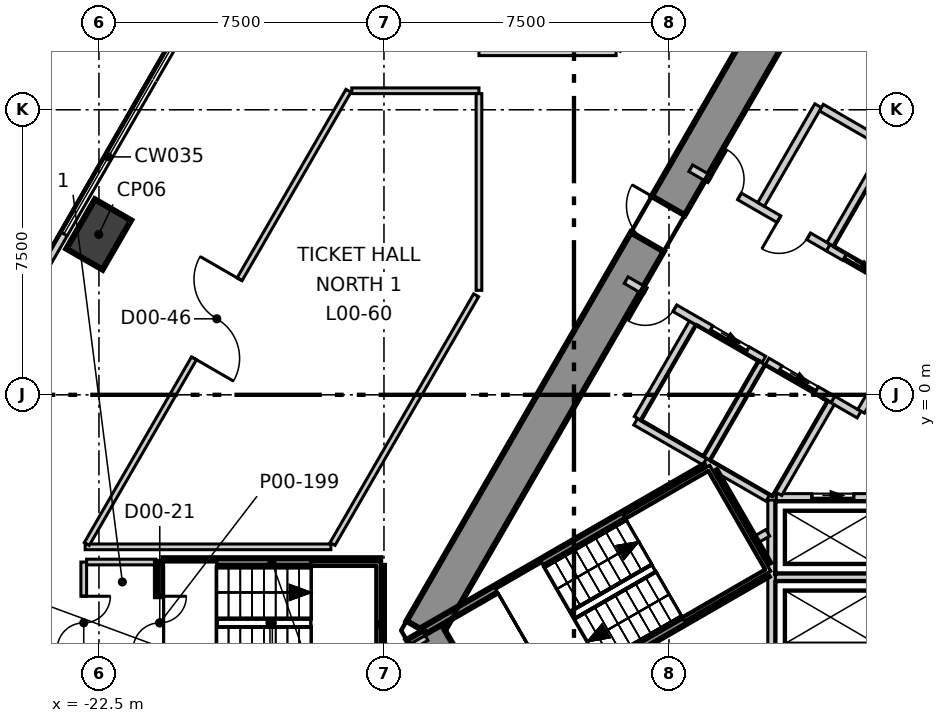
"""IFC4 building model, lengths in metres.
Left out: names, types, materials, properties, quantities, classifications, styles, units other than length and angle.
Written with IfcOpenShell. Run it as: python <this file> out.ifc"""

import sys

from ifc_helpers import new_model, si_unit, direction, frame, frame_2d, origin, origin_2d, place, context, subcontext, project, spatial, polyline, rectangle, outline, extrude, element, fill, save


model = new_model("IFC4")
c1 = context("Model", 3, precision=1e-05, world=origin(), true_north=direction((0.0, 1.0)))
c2 = subcontext(c1, "Body", "Model", "MODEL_VIEW")
j1 = project(units=[si_unit("LENGTHUNIT", "METRE"), si_unit("PLANEANGLEUNIT", "RADIAN")], contexts=[c1])
p1 = place(None, origin())
s1 = spatial("IfcSite", under=j1, at=p1, CompositionType="ELEMENT")
p2 = place(p1, origin())
s2 = spatial("IfcBuilding", under=s1, at=p2, CompositionType="ELEMENT")
p3 = place(p2, origin())
s3 = spatial("IfcBuildingStorey", under=s2, at=p3, CompositionType="ELEMENT", Elevation=0.0)
p4 = place(p3, frame((-1.617, 15.2, -0.4), z_axis=(0.0, 0.0, 1.0), x_axis=(-0.499992141631, -0.866029940768, 0.0)))
e1 = element("IfcWall", 1, at=p4, inside=s3, PredefinedType="SHEAR", context=c2, shape_type="SweptSolid", body=[
    extrude(outline(polyline([(-0.289, -0.499), (1.656, -0.499), (3.601, -0.499), (5.547, -0.499), (7.492, -0.499), (9.437, -0.5), (11.382, -0.5), (13.328, -0.5), (15.273, -0.5), (17.218, -0.5), (19.163, -0.5), (21.109, -0.5), (23.054, -0.5), (24.999, -0.5), (24.422, 0.5), (22.566, 0.5), (20.709, 0.5), (18.853, 0.5), (16.997, 0.5), (15.14, 0.5), (13.284, 0.5), (11.427, 0.5), (9.571, 0.5), (7.715, 0.5), (5.858, 0.5), (4.002, 0.5), (2.146, 0.5), (0.289, 0.5), (-0.289, -0.499)])), origin(), (0.0, 0.0, 1.0), 8.5),
])
p5 = place(p4, frame((11.805, 0.0, 0.4)))
e2 = element("IfcOpeningElement", 2, at=p5, cuts=e1, PredefinedType="OPENING", context=c2, shape_type="SweptSolid", body=[
    extrude(rectangle(XDim=1.1, YDim=2.1, at=frame_2d((0.55, 1.05))), frame((0.0, 0.51, 0.0), z_axis=(0.0, -1.0, 0.0), x_axis=(1.0, 0.0, 0.0)), (0.0, 0.0, 1.0), 1.02),
])
p6 = place(p3, frame((-13.972, -6.2, -0.4), z_axis=(0.0, 0.0, 1.0), x_axis=(0.500077567175, -0.865980615723, 0.0)))
e3 = element("IfcWall", 3, at=p6, inside=s3, PredefinedType="SHEAR", context=c2, shape_type="SweptSolid", body=[
    extrude(outline(polyline([(-0.289, -0.5), (1.616, -0.5), (3.522, -0.5), (2.944, 0.499), (1.617, 0.5), (0.289, 0.5), (-0.289, -0.5)])), origin(), (0.0, 0.0, 1.0), 8.5),
])
p7 = place(p6, frame((0.917, 0.0, 0.4)))
e4 = element("IfcOpeningElement", 4, at=p7, cuts=e3, PredefinedType="OPENING", context=c2, shape_type="SweptSolid", body=[
    extrude(rectangle(XDim=1.4, YDim=2.1, at=frame_2d((0.7, 1.05))), frame((0.0, 0.51, 0.0), z_axis=(0.0, -1.0, 0.0), x_axis=(1.0, 0.0, 0.0)), (0.0, 0.0, 1.0), 1.02),
])
p8 = place(p3, frame((-22.506, 4.219, -0.4), z_axis=(0.0, 0.0, 1.0), x_axis=(0.5, 0.866025403784, 0.0)))
e5 = element("IfcColumn", 5, at=p8, inside=s3, PredefinedType="COLUMN", context=c2, shape_type="SweptSolid", body=[
    extrude(rectangle(XDim=1.5, YDim=1.1, at=origin_2d()), origin(), (0.0, 0.0, 1.0), 8.5),
])
p9 = place(p3, frame((-23.422, 4.232, 0.0), z_axis=(0.0, 0.0, 1.0), x_axis=(-0.500009288593, -0.866020040946, 0.0)))
e6 = element("IfcWall", 6, at=p9, inside=s3, PredefinedType="ELEMENTEDWALL", context=c2, shape_type="SweptSolid", body=[
    extrude(rectangle(XDim=4.2, YDim=0.2, at=frame_2d((2.1, 0.0))), origin(), (0.0, 0.0, 1.0), 8.1),
])
p10 = place(p9, frame((0.9, 0.0, 0.0)))
e7 = element("IfcOpeningElement", 7, at=p10, cuts=e6, PredefinedType="OPENING", context=c2, shape_type="SweptSolid", body=[
    extrude(rectangle(XDim=2.4, YDim=3.2, at=frame_2d((1.2, 1.6))), frame((0.0, 0.11, 0.0), z_axis=(0.0, -1.0, 0.0), x_axis=(1.0, 0.0, 0.0)), (0.0, 0.0, 1.0), 0.22),
])
p11 = place(p3, frame((-22.9, -7.525, 0.0), z_axis=(0.0, 0.0, 1.0), x_axis=(0.0, 1.0, 0.0)))
e8 = element("IfcWall", 8, at=p11, inside=s3, PredefinedType="PARTITIONING", context=c2, shape_type="SweptSolid", body=[
    extrude(rectangle(XDim=3.125, YDim=0.15, at=frame_2d((1.562, 0.0))), origin(), (0.0, 0.0, 1.0), 8.1),
])
p12 = place(p11, frame((0.825, 0.0, 0.0)))
e9 = element("IfcOpeningElement", 9, at=p12, cuts=e8, PredefinedType="OPENING", context=c2, shape_type="SweptSolid", body=[
    extrude(rectangle(XDim=1.4, YDim=2.1, at=frame_2d((0.7, 1.05))), frame((0.0, 0.085, 0.0), z_axis=(0.0, -1.0, 0.0), x_axis=(1.0, 0.0, 0.0)), (0.0, 0.0, 1.0), 0.17),
])
p13 = place(p3, frame((-22.825, -4.4, 0.0), z_axis=(0.0, 0.0, 1.0), x_axis=(1.0, 0.0, 0.0)))
e10 = element("IfcWall", 10, at=p13, inside=s3, PredefinedType="PARTITIONING", context=c2, shape_type="SweptSolid", body=[
    extrude(rectangle(XDim=1.825, YDim=0.15, at=frame_2d((0.913, 0.0))), origin(), (0.0, 0.0, 1.0), 8.1),
])
p14 = place(p3, frame((-15.0, -7.044, 0.0), z_axis=(0.0, 0.0, 1.0), x_axis=(0.866025099701, 0.500000526688, 0.0)))
e11 = element("IfcWall", 11, at=p14, inside=s3, PredefinedType="PARTITIONING", context=c2, shape_type="SweptSolid", body=[
    extrude(rectangle(XDim=1.292, YDim=0.15, at=frame_2d((0.646, 0.0))), origin(), (0.0, 0.0, 1.0), 8.1),
])
p15 = place(p3, frame((-22.863, -4.0, 0.0), z_axis=(0.0, 0.0, 1.0), x_axis=(1.0, 0.0, 0.0)))
e12 = element("IfcWall", 12, at=p15, inside=s3, PredefinedType="PARTITIONING", context=c2, shape_type="SweptSolid", body=[
    extrude(rectangle(XDim=6.466, YDim=0.15, at=frame_2d((3.233, 0.0))), origin(), (0.0, 0.0, 1.0), 8.1),
])
p16 = place(p3, frame((-12.5, 9.0, 0.0), z_axis=(0.0, 0.0, 1.0), x_axis=(1.0, 0.0, 0.0)))
e13 = element("IfcWall", 13, at=p16, inside=s3, PredefinedType="PARTITIONING", context=c2, shape_type="SweptSolid", body=[
    extrude(rectangle(XDim=3.609, YDim=0.15, at=frame_2d((1.804, 0.0))), origin(), (0.0, 0.0, 1.0), 8.1),
])
p17 = place(p3, frame((-22.82, -3.925, 0.0), z_axis=(0.0, 0.0, 1.0), x_axis=(0.500004336333, 0.866022900187, 0.0)))
e14 = element("IfcWall", 14, at=p17, inside=s3, PredefinedType="PARTITIONING", context=c2, shape_type="SweptSolid", body=[
    extrude(rectangle(XDim=13.77, YDim=0.15, at=frame_2d((6.885, 0.0))), origin(), (0.0, 0.0, 1.0), 8.1),
])
p18 = place(p17, frame((5.642, 0.0, 0.0)))
e15 = element("IfcOpeningElement", 15, at=p18, cuts=e14, PredefinedType="OPENING", context=c2, shape_type="SweptSolid", body=[
    extrude(rectangle(XDim=2.4, YDim=2.1, at=frame_2d((1.2, 1.05))), frame((0.0, 0.085, 0.0), z_axis=(0.0, -1.0, 0.0), x_axis=(1.0, 0.0, 0.0)), (0.0, 0.0, 1.0), 0.17),
])
p19 = place(p3, frame((-15.848, 8.0, 0.0), z_axis=(0.0, 0.0, 1.0), x_axis=(1.0, 0.0, 0.0)))
e16 = element("IfcWall", 16, at=p19, inside=s3, PredefinedType="PARTITIONING", context=c2, shape_type="SweptSolid", body=[
    extrude(rectangle(XDim=3.348, YDim=0.15, at=frame_2d((1.674, 0.0))), origin(), (0.0, 0.0, 1.0), 8.1),
])
p20 = place(p3, frame((-12.5, 2.749, 0.0), z_axis=(0.0, 0.0, 1.0), x_axis=(0.0, 1.0, 0.0)))
e17 = element("IfcWall", 17, at=p20, inside=s3, PredefinedType="PARTITIONING", context=c2, shape_type="SweptSolid", body=[
    extrude(rectangle(XDim=5.176, YDim=0.15, at=frame_2d((2.588, 0.0))), origin(), (0.0, 0.0, 1.0), 8.1),
])
p21 = place(p3, frame((-16.353, -3.925, 0.0), z_axis=(0.0, 0.0, 1.0), x_axis=(0.499992812315, 0.866029553557, 0.0)))
e18 = element("IfcWall", 18, at=p21, inside=s3, PredefinedType="PARTITIONING", context=c2, shape_type="SweptSolid", body=[
    extrude(rectangle(XDim=7.556, YDim=0.15, at=frame_2d((3.778, 0.0))), origin(), (0.0, 0.0, 1.0), 8.1),
])
p22 = place(p3, frame((-8.376, -0.707, 0.0), z_axis=(0.0, 0.0, 1.0), x_axis=(0.866067520717, -0.499927044236, 0.0)))
e19 = element("IfcWall", 19, at=p22, inside=s3, PredefinedType="SOLIDWALL", context=c2, shape_type="SweptSolid", body=[
    extrude(rectangle(XDim=2.1, YDim=0.2, at=frame_2d((1.05, 0.0))), origin(), (0.0, 0.0, 1.0), 8.1),
])
p23 = place(p3, frame((-8.326, -0.62, 0.0), z_axis=(0.0, 0.0, 1.0), x_axis=(0.500023687443, 0.866011727401, 0.0)))
e20 = element("IfcWall", 20, at=p23, inside=s3, PredefinedType="SOLIDWALL", context=c2, shape_type="SweptSolid", body=[
    extrude(rectangle(XDim=2.9, YDim=0.2, at=frame_2d((1.45, 0.0))), origin(), (0.0, 0.0, 1.0), 8.1),
])
p24 = place(p3, frame((-4.8, -6.9, 0.0), z_axis=(0.0, 0.0, 1.0), x_axis=(0.0, 1.0, 0.0)))
e21 = element("IfcWall", 21, at=p24, inside=s3, PredefinedType="SOLIDWALL", context=c2, shape_type="SweptSolid", body=[
    extrude(rectangle(XDim=4.131, YDim=0.2, at=frame_2d((2.065, 0.0))), origin(), (0.0, 0.0, 1.0), 8.1),
])
p25 = place(p3, frame((-4.7, -4.8, 0.0), z_axis=(0.0, 0.0, 1.0), x_axis=(1.0, 0.0, 0.0)))
e22 = element("IfcWall", 22, at=p25, inside=s3, PredefinedType="SOLIDWALL", context=c2, shape_type="SweptSolid", body=[
    extrude(rectangle(XDim=2.9, YDim=0.2, at=frame_2d((1.45, 0.0))), origin(), (0.0, 0.0, 1.0), 8.1),
])
p26 = place(p3, frame((-4.676, -2.7, 0.0), z_axis=(0.0, 0.0, 1.0), x_axis=(1.0, 0.0, 0.0)))
e23 = element("IfcWall", 23, at=p26, inside=s3, PredefinedType="SOLIDWALL", context=c2, shape_type="SweptSolid", body=[
    extrude(rectangle(XDim=2.873, YDim=0.2, at=frame_2d((1.437, 0.0))), origin(), (0.0, 0.0, 1.0), 8.1),
])
p27 = place(p26, frame((0.937, 0.0, 0.0)))
e24 = element("IfcOpeningElement", 24, at=p27, cuts=e23, PredefinedType="OPENING", context=c2, shape_type="SweptSolid", body=[
    extrude(rectangle(XDim=1.1, YDim=2.1, at=frame_2d((0.55, 1.05))), frame((0.0, 0.11, 0.0), z_axis=(0.0, -1.0, 0.0), x_axis=(1.0, 0.0, 0.0)), (0.0, 0.0, 1.0), 0.22),
])
p28 = place(p3, frame((-8.627, 3.018, 0.0), z_axis=(0.0, 0.0, 1.0), x_axis=(0.866039775641, -0.499975106388, 0.0)))
e25 = element("IfcWall", 25, at=p28, inside=s3, PredefinedType="SOLIDWALL", context=c2, shape_type="SweptSolid", body=[
    extrude(rectangle(XDim=4.182, YDim=0.2, at=frame_2d((2.091, 0.0))), origin(), (0.0, 0.0, 1.0), 8.1),
])
p29 = place(p28, frame((2.58, 0.0, 0.0)))
e26 = element("IfcOpeningElement", 26, at=p29, cuts=e25, PredefinedType="OPENING", context=c2, shape_type="SweptSolid", body=[
    extrude(rectangle(XDim=1.1, YDim=2.1, at=frame_2d((0.55, 1.05))), frame((0.0, 0.11, 0.0), z_axis=(0.0, -1.0, 0.0), x_axis=(1.0, 0.0, 0.0)), (0.0, 0.0, 1.0), 0.22),
])
p30 = place(p28, frame((0.58, 0.0, 0.0)))
e27 = element("IfcOpeningElement", 27, at=p30, cuts=e25, PredefinedType="OPENING", context=c2, shape_type="SweptSolid", body=[
    extrude(rectangle(XDim=0.9, YDim=2.1, at=frame_2d((0.45, 1.05))), frame((0.0, 0.11, 0.0), z_axis=(0.0, -1.0, 0.0), x_axis=(1.0, 0.0, 0.0)), (0.0, 0.0, 1.0), 0.22),
])
p31 = place(p3, frame((-3.188, -0.122, 0.0), z_axis=(0.0, 0.0, 1.0), x_axis=(0.865705793592, -0.50055317294, 0.0)))
e28 = element("IfcWall", 28, at=p31, inside=s3, PredefinedType="SOLIDWALL", context=c2, shape_type="SweptSolid", body=[
    extrude(rectangle(XDim=0.797, YDim=0.2, at=frame_2d((0.398, 0.0))), origin(), (0.0, 0.0, 1.0), 8.1),
])
p32 = place(p3, frame((-6.927, 5.962, 0.0), z_axis=(0.0, 0.0, 1.0), x_axis=(0.866065051207, -0.49993132236, 0.0)))
e29 = element("IfcWall", 29, at=p32, inside=s3, PredefinedType="SOLIDWALL", context=c2, shape_type="SweptSolid", body=[
    extrude(rectangle(XDim=4.182, YDim=0.2, at=frame_2d((2.091, 0.0))), origin(), (0.0, 0.0, 1.0), 8.1),
])
p33 = place(p32, frame((2.68, 0.0, 0.0)))
e30 = element("IfcOpeningElement", 30, at=p33, cuts=e29, PredefinedType="OPENING", context=c2, shape_type="SweptSolid", body=[
    extrude(rectangle(XDim=0.9, YDim=2.1, at=frame_2d((0.45, 1.05))), frame((0.0, 0.11, 0.0), z_axis=(0.0, -1.0, 0.0), x_axis=(1.0, 0.0, 0.0)), (0.0, 0.0, 1.0), 0.22),
])
p34 = place(p32, frame((0.58, 0.0, 0.0)))
e31 = element("IfcOpeningElement", 31, at=p34, cuts=e29, PredefinedType="OPENING", context=c2, shape_type="SweptSolid", body=[
    extrude(rectangle(XDim=0.9, YDim=2.1, at=frame_2d((0.45, 1.05))), frame((0.0, 0.11, 0.0), z_axis=(0.0, -1.0, 0.0), x_axis=(1.0, 0.0, 0.0)), (0.0, 0.0, 1.0), 0.22),
])
p35 = place(p3, frame((-5.076, 5.009, 0.0), z_axis=(0.0, 0.0, 1.0), x_axis=(0.50002537861, 0.866010750942, 0.0)))
e32 = element("IfcWall", 32, at=p35, inside=s3, PredefinedType="SOLIDWALL", context=c2, shape_type="SweptSolid", body=[
    extrude(rectangle(XDim=3.0, YDim=0.2, at=frame_2d((1.5, 0.0))), origin(), (0.0, 0.0, 1.0), 8.1),
])
p36 = place(p3, frame((-3.489, 7.557, 0.0), z_axis=(0.0, 0.0, 1.0), x_axis=(0.866010750942, -0.50002537861, 0.0)))
e33 = element("IfcWall", 33, at=p36, inside=s3, PredefinedType="SOLIDWALL", context=c2, shape_type="SweptSolid", body=[
    extrude(rectangle(XDim=2.0, YDim=0.2, at=frame_2d((1.0, 0.0))), origin(), (0.0, 0.0, 1.0), 8.1),
])
p37 = place(p3, frame((-2.444, -0.433, 0.0), z_axis=(0.0, 0.0, 1.0), x_axis=(0.500035624827, 0.866004834804, 0.0)))
e34 = element("IfcWall", 34, at=p37, inside=s3, PredefinedType="SOLIDWALL", context=c2, shape_type="SweptSolid", body=[
    extrude(rectangle(XDim=3.194, YDim=0.2, at=frame_2d((1.597, 0.0))), origin(), (0.0, 0.0, 1.0), 8.1),
])
p38 = place(p3, frame((-6.557, -1.757, 0.0), z_axis=(0.0, 0.0, 1.0), x_axis=(0.8659754619, -0.500086491905, 0.0)))
e35 = element("IfcWall", 35, at=p38, inside=s3, PredefinedType="SOLIDWALL", context=c2, shape_type="SweptSolid", body=[
    extrude(rectangle(XDim=1.916, YDim=0.2, at=frame_2d((0.958, 0.0))), origin(), (0.0, 0.0, 1.0), 8.1),
])
p39 = place(p3, frame((-6.507, -1.67, 0.0), z_axis=(0.0, 0.0, 1.0), x_axis=(0.50012328804, 0.865954211699, 0.0)))
e36 = element("IfcWall", 36, at=p39, inside=s3, PredefinedType="SOLIDWALL", context=c2, shape_type="SweptSolid", body=[
    extrude(rectangle(XDim=2.9, YDim=0.2, at=frame_2d((1.45, 0.0))), origin(), (0.0, 0.0, 1.0), 8.1),
])
p40 = place(p3, frame((-4.92, 0.878, 0.0), z_axis=(0.0, 0.0, 1.0), x_axis=(0.866010750942, -0.50002537861, 0.0)))
e37 = element("IfcWall", 37, at=p40, inside=s3, PredefinedType="SOLIDWALL", context=c2, shape_type="SweptSolid", body=[
    extrude(rectangle(XDim=2.0, YDim=0.2, at=frame_2d((1.0, 0.0))), origin(), (0.0, 0.0, 1.0), 8.1),
])
p41 = place(p40, frame((0.4, 0.0, 0.0)))
e38 = element("IfcOpeningElement", 38, at=p41, cuts=e37, PredefinedType="OPENING", context=c2, shape_type="SweptSolid", body=[
    extrude(rectangle(XDim=1.1, YDim=2.1, at=frame_2d((0.55, 1.05))), frame((0.0, 0.11, 0.0), z_axis=(0.0, -1.0, 0.0), x_axis=(1.0, 0.0, 0.0)), (0.0, 0.0, 1.0), 0.22),
])
p42 = place(p3, frame((-4.619, -2.6, 0.0), z_axis=(0.0, 0.0, 1.0), x_axis=(0.50009492287, 0.865970593103, 0.0)))
e39 = element("IfcWall", 39, at=p42, inside=s3, PredefinedType="SOLIDWALL", context=c2, shape_type="SweptSolid", body=[
    extrude(rectangle(XDim=2.761, YDim=0.2, at=frame_2d((1.381, 0.0))), origin(), (0.0, 0.0, 1.0), 8.1),
])
p43 = place(p3, frame((-3.309, 3.873, 0.0), z_axis=(0.0, 0.0, 1.0), x_axis=(0.866098583652, -0.499873227325, 0.0)))
e40 = element("IfcWall", 40, at=p43, inside=s3, PredefinedType="SOLIDWALL", context=c2, shape_type="SweptSolid", body=[
    extrude(rectangle(XDim=2.103, YDim=0.2, at=frame_2d((1.051, 0.0))), origin(), (0.0, 0.0, 1.0), 8.1),
])
p44 = place(p43, frame((0.502, 0.0, 0.0)))
e41 = element("IfcOpeningElement", 41, at=p44, cuts=e40, PredefinedType="OPENING", context=c2, shape_type="SweptSolid", body=[
    extrude(rectangle(XDim=1.1, YDim=2.1, at=frame_2d((0.55, 1.05))), frame((0.0, 0.11, 0.0), z_axis=(0.0, -1.0, 0.0), x_axis=(1.0, 0.0, 0.0)), (0.0, 0.0, 1.0), 0.22),
])
p45 = place(p3, frame((-3.257, 3.959, 0.0), z_axis=(0.0, 0.0, 1.0), x_axis=(0.50012328804, 0.865954211699, 0.0)))
e42 = element("IfcWall", 42, at=p45, inside=s3, PredefinedType="SOLIDWALL", context=c2, shape_type="SweptSolid", body=[
    extrude(rectangle(XDim=2.9, YDim=0.2, at=frame_2d((1.45, 0.0))), origin(), (0.0, 0.0, 1.0), 8.1),
])
p46 = place(p3, frame((-5.195, -3.801, 0.0), z_axis=(0.0, 0.0, 1.0), x_axis=(0.86665063443, 0.498915501706, 0.0)))
e43 = element("IfcWall", 43, at=p46, inside=s3, PredefinedType="SOLIDWALL", context=c2, shape_type="SweptSolid", body=[
    extrude(rectangle(XDim=0.341, YDim=0.2, at=frame_2d((0.17, 0.0))), origin(), (0.0, 0.0, 1.0), 8.1),
])
p47 = place(p3, frame((-13.946, -6.204, 0.0), z_axis=(0.0, 0.0, 1.0), x_axis=(0.866036527536, 0.499980732602, 0.0)))
e44 = element("IfcWall", 44, at=p47, inside=s3, PredefinedType="SOLIDWALL", context=c2, shape_type="SweptSolid", body=[
    extrude(rectangle(XDim=8.564, YDim=0.2, at=frame_2d((4.282, 0.0))), origin(), (0.0, 0.0, 1.0), 8.1),
])
p48 = place(p3, frame((-6.329, -2.038, 0.0), z_axis=(0.0, 0.0, 1.0), x_axis=(0.500200581029, -0.865909567298, 0.0)))
e45 = element("IfcWall", 45, at=p48, inside=s3, PredefinedType="SOLIDWALL", context=c2, shape_type="SweptSolid", body=[
    extrude(rectangle(XDim=2.799, YDim=0.2, at=frame_2d((1.399, 0.0))), origin(), (0.0, 0.0, 1.0), 8.1),
])
p49 = place(p3, frame((-12.346, -8.976, 0.0), z_axis=(0.0, 0.0, 1.0), x_axis=(0.865987152174, 0.50006624788, 0.0)))
e46 = element("IfcWall", 46, at=p49, inside=s3, PredefinedType="SOLIDWALL", context=c2, shape_type="SweptSolid", body=[
    extrude(rectangle(XDim=8.565, YDim=0.2, at=frame_2d((4.282, 0.0))), origin(), (0.0, 0.0, 1.0), 8.1),
])
p50 = place(p3, frame((-20.9, -7.6, 0.0), z_axis=(0.0, 0.0, 1.0), x_axis=(0.0, 1.0, 0.0)))
e47 = element("IfcWall", 47, at=p50, inside=s3, PredefinedType="SOLIDWALL", context=c2, shape_type="SweptSolid", body=[
    extrude(rectangle(XDim=3.2, YDim=0.2, at=frame_2d((1.6, 0.0))), origin(), (0.0, 0.0, 1.0), 8.1),
])
p51 = place(p50, frame((0.9, 0.0, 0.0)))
e48 = element("IfcOpeningElement", 48, at=p51, cuts=e47, PredefinedType="OPENING", context=c2, shape_type="SweptSolid", body=[
    extrude(rectangle(XDim=1.4, YDim=2.1, at=frame_2d((0.7, 1.05))), frame((0.0, 0.11, 0.0), z_axis=(0.0, -1.0, 0.0), x_axis=(1.0, 0.0, 0.0)), (0.0, 0.0, 1.0), 0.22),
])
p52 = place(p3, frame((-20.8, -4.4, 0.0), z_axis=(0.0, 0.0, 1.0), x_axis=(1.0, 0.0, 0.0)))
e49 = element("IfcWall", 49, at=p52, inside=s3, PredefinedType="SOLIDWALL", context=c2, shape_type="SweptSolid", body=[
    extrude(rectangle(XDim=5.7, YDim=0.2, at=frame_2d((2.85, 0.0))), origin(), (0.0, 0.0, 1.0), 8.1),
])
p53 = place(p3, frame((-15.1, -7.6, 0.0), z_axis=(0.0, 0.0, 1.0), x_axis=(0.0, 1.0, 0.0)))
e50 = element("IfcWall", 50, at=p53, inside=s3, PredefinedType="SOLIDWALL", context=c2, shape_type="SweptSolid", body=[
    extrude(rectangle(XDim=3.1, YDim=0.2, at=frame_2d((1.55, 0.0))), origin(), (0.0, 0.0, 1.0), 8.1),
])
p54 = place(p27, origin())
e51 = element("IfcDoor", 51, at=p54, inside=s3, OperationType="SLIDING_TO_LEFT", PredefinedType="DOOR", context=c2, shape_type="SweptSolid", body=[
    extrude(rectangle(XDim=1.1, YDim=2.1, at=frame_2d((0.55, 1.05))), frame((0.0, 0.025, 0.0), z_axis=(0.0, -1.0, 0.0), x_axis=(1.0, 0.0, 0.0)), (0.0, 0.0, 1.0), 0.05),
])
fill(e24, e51)
p55 = place(p41, origin())
e52 = element("IfcDoor", 52, at=p55, inside=s3, OperationType="SLIDING_TO_LEFT", PredefinedType="DOOR", context=c2, shape_type="SweptSolid", body=[
    extrude(rectangle(XDim=1.1, YDim=2.1, at=frame_2d((0.55, 1.05))), frame((0.0, 0.025, 0.0), z_axis=(0.0, -1.0, 0.0), x_axis=(1.0, 0.0, 0.0)), (0.0, 0.0, 1.0), 0.05),
])
fill(e38, e52)
p56 = place(p44, origin())
e53 = element("IfcDoor", 53, at=p56, inside=s3, OperationType="SLIDING_TO_LEFT", PredefinedType="DOOR", context=c2, shape_type="SweptSolid", body=[
    extrude(rectangle(XDim=1.1, YDim=2.1, at=frame_2d((0.55, 1.05))), frame((0.0, 0.025, 0.0), z_axis=(0.0, -1.0, 0.0), x_axis=(1.0, 0.0, 0.0)), (0.0, 0.0, 1.0), 0.05),
])
fill(e41, e53)
p57 = place(p29, origin())
e54 = element("IfcDoor", 54, at=p57, inside=s3, OperationType="SLIDING_TO_LEFT", PredefinedType="DOOR", context=c2, shape_type="SweptSolid", body=[
    extrude(rectangle(XDim=1.1, YDim=2.1, at=frame_2d((0.55, 1.05))), frame((0.0, 0.025, 0.0), z_axis=(0.0, -1.0, 0.0), x_axis=(1.0, 0.0, 0.0)), (0.0, 0.0, 1.0), 0.05),
])
fill(e26, e54)
p58 = place(p33, origin())
e55 = element("IfcDoor", 55, at=p58, inside=s3, OperationType="SINGLE_SWING_LEFT", PredefinedType="DOOR", context=c2, shape_type="SweptSolid", body=[
    extrude(rectangle(XDim=0.9, YDim=2.1, at=frame_2d((0.45, 1.05))), frame((0.0, 0.025, 0.0), z_axis=(0.0, -1.0, 0.0), x_axis=(1.0, 0.0, 0.0)), (0.0, 0.0, 1.0), 0.05),
])
fill(e30, e55)
p59 = place(p51, origin())
e56 = element("IfcDoor", 56, at=p59, inside=s3, OperationType="DOUBLE_DOOR_SINGLE_SWING", PredefinedType="DOOR", context=c2, shape_type="SweptSolid", body=[
    extrude(rectangle(XDim=1.4, YDim=2.1, at=frame_2d((0.7, 1.05))), frame((0.0, 0.025, 0.0), z_axis=(0.0, -1.0, 0.0), x_axis=(1.0, 0.0, 0.0)), (0.0, 0.0, 1.0), 0.05),
])
fill(e48, e56)
p60 = place(p12, origin())
e57 = element("IfcDoor", 57, at=p60, inside=s3, OperationType="DOUBLE_DOOR_SINGLE_SWING", PredefinedType="DOOR", context=c2, shape_type="SweptSolid", body=[
    extrude(rectangle(XDim=1.4, YDim=2.1, at=frame_2d((0.7, 1.05))), frame((0.0, 0.025, 0.0), z_axis=(0.0, -1.0, 0.0), x_axis=(1.0, 0.0, 0.0)), (0.0, 0.0, 1.0), 0.05),
])
fill(e9, e57)
p61 = place(p18, origin())
e58 = element("IfcDoor", 58, at=p61, inside=s3, OperationType="DOUBLE_DOOR_SINGLE_SWING", PredefinedType="DOOR", context=c2, shape_type="SweptSolid", body=[
    extrude(rectangle(XDim=2.4, YDim=2.1, at=frame_2d((1.2, 1.05))), frame((0.0, 0.025, 0.0), z_axis=(0.0, -1.0, 0.0), x_axis=(1.0, 0.0, 0.0)), (0.0, 0.0, 1.0), 0.05),
])
fill(e15, e58)
p62 = place(p5, origin())
e59 = element("IfcDoor", 59, at=p62, inside=s3, OperationType="SINGLE_SWING_LEFT", PredefinedType="DOOR", context=c2, shape_type="SweptSolid", body=[
    extrude(rectangle(XDim=1.1, YDim=2.1, at=frame_2d((0.55, 1.05))), frame((0.0, 0.025, 0.0), z_axis=(0.0, -1.0, 0.0), x_axis=(1.0, 0.0, 0.0)), (0.0, 0.0, 1.0), 0.05),
])
fill(e2, e59)
p63 = place(p30, origin())
e60 = element("IfcDoor", 60, at=p63, inside=s3, OperationType="SINGLE_SWING_LEFT", PredefinedType="DOOR", context=c2, shape_type="SweptSolid", body=[
    extrude(rectangle(XDim=0.9, YDim=2.1, at=frame_2d((0.45, 1.05))), frame((0.0, 0.025, 0.0), z_axis=(0.0, -1.0, 0.0), x_axis=(1.0, 0.0, 0.0)), (0.0, 0.0, 1.0), 0.05),
])
fill(e27, e60)
p64 = place(p34, origin())
e61 = element("IfcDoor", 61, at=p64, inside=s3, OperationType="SINGLE_SWING_RIGHT", PredefinedType="DOOR", context=c2, shape_type="SweptSolid", body=[
    extrude(rectangle(XDim=0.9, YDim=2.1, at=frame_2d((0.45, 1.05))), frame((0.0, 0.025, 0.0), z_axis=(0.0, -1.0, 0.0), x_axis=(1.0, 0.0, 0.0)), (0.0, 0.0, 1.0), 0.05),
])
fill(e31, e61)
save(model, sys.argv[1])
